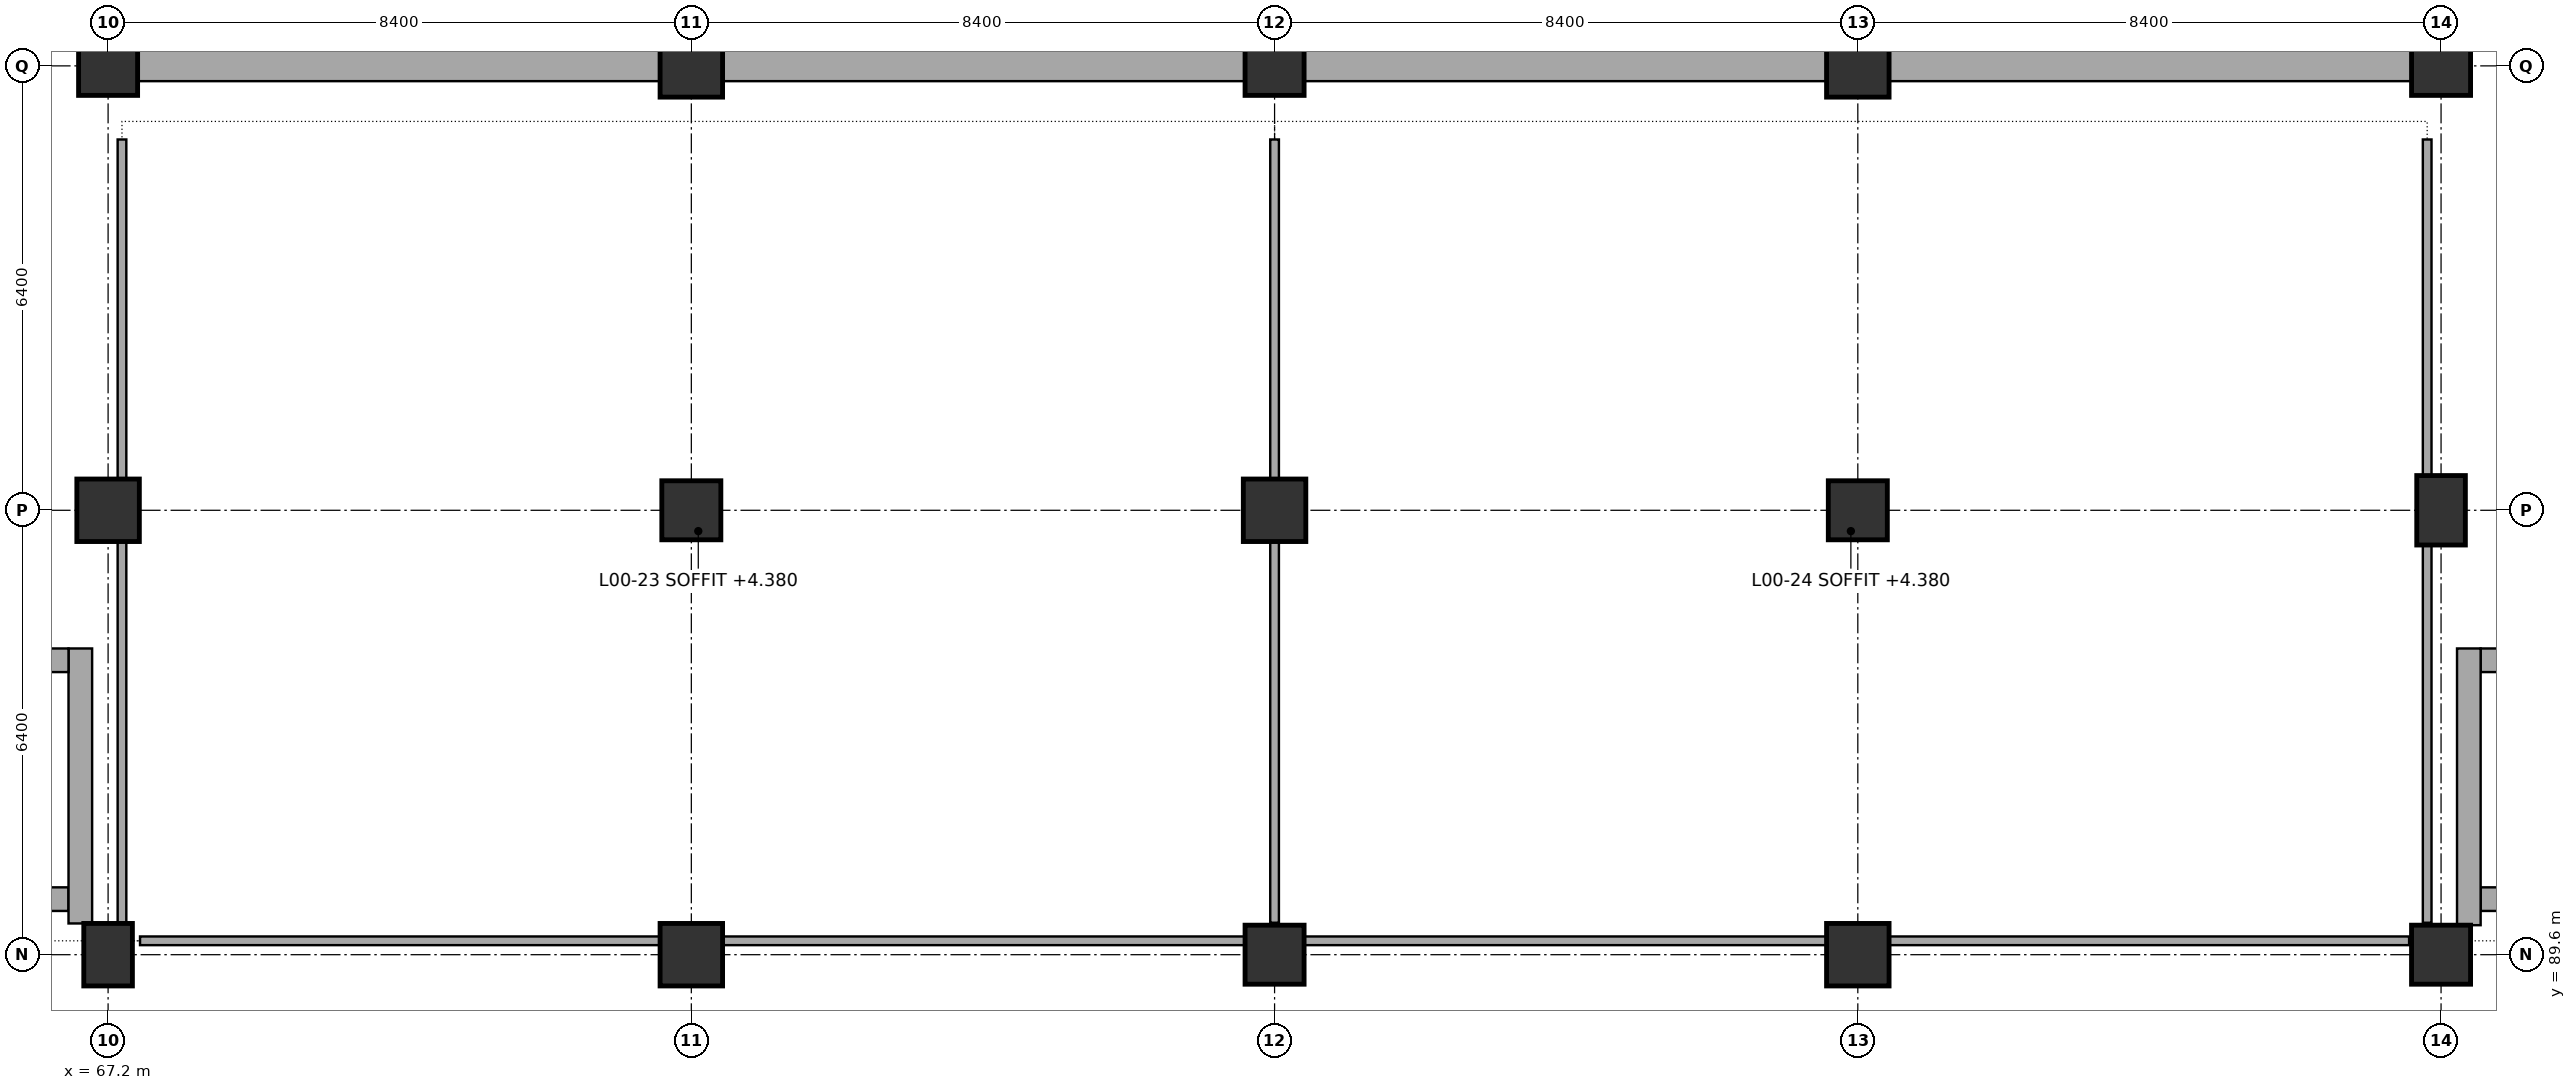
"""IFC4 building model, lengths in metres.
Left out: names, types, materials, properties, quantities, classifications, styles, units other than length and angle.
Written with IfcOpenShell. Run it as: python <this file> out.ifc"""

import sys

from ifc_helpers import new_model, si_unit, direction, frame, frame_2d, origin, origin_2d, place, context, subcontext, project, spatial, rectangle, extrude, element, fill, save


model = new_model("IFC4")
c1 = context("Model", 3, precision=1e-05, world=origin(), true_north=direction((0.0, 1.0)))
c2 = subcontext(c1, "Body", "Model", "MODEL_VIEW")
j1 = project(units=[si_unit("LENGTHUNIT", "METRE"), si_unit("PLANEANGLEUNIT", "RADIAN")], contexts=[c1])
p1 = place(None, origin())
s1 = spatial("IfcSite", under=j1, at=p1, CompositionType="ELEMENT")
p2 = place(p1, origin())
s2 = spatial("IfcBuilding", under=s1, at=p2, CompositionType="ELEMENT")
p3 = place(p2, origin())
s3 = spatial("IfcBuildingStorey", under=s2, at=p3, CompositionType="ELEMENT", Elevation=0.0)
p4 = place(p3, frame((67.2, 89.6, 0.0), z_axis=(0.0, 0.0, 1.0), x_axis=(1.0, 0.0, 0.0)))
e1 = element("IfcColumn", 1, at=p4, inside=s3, PredefinedType="COLUMN", context=c2, shape_type="SweptSolid", body=[
    extrude(rectangle(XDim=0.7, YDim=0.9, at=origin_2d()), origin(), (0.0, 0.0, 1.0), 4.8),
])
p5 = place(p3, frame((67.2, 96.0, 0.0), z_axis=(0.0, 0.0, 1.0), x_axis=(1.0, 0.0, 0.0)))
e2 = element("IfcColumn", 2, at=p5, inside=s3, PredefinedType="COLUMN", context=c2, shape_type="SweptSolid", body=[
    extrude(rectangle(XDim=0.9, YDim=0.9, at=origin_2d()), origin(), (0.0, 0.0, 1.0), 4.8),
])
p6 = place(p3, frame((67.2, 102.4, 0.0), z_axis=(0.0, 0.0, 1.0), x_axis=(1.0, 0.0, 0.0)))
e3 = element("IfcColumn", 3, at=p6, inside=s3, PredefinedType="COLUMN", context=c2, shape_type="SweptSolid", body=[
    extrude(rectangle(XDim=0.85, YDim=0.85, at=origin_2d()), origin(), (0.0, 0.0, 1.0), 4.8),
])
p7 = place(p3, frame((75.6, 89.6, 0.0), z_axis=(0.0, 0.0, 1.0), x_axis=(1.0, 0.0, 0.0)))
e4 = element("IfcColumn", 4, at=p7, inside=s3, PredefinedType="COLUMN", context=c2, shape_type="SweptSolid", body=[
    extrude(rectangle(XDim=0.9, YDim=0.9, at=origin_2d()), origin(), (0.0, 0.0, 1.0), 4.8),
])
p8 = place(p3, frame((75.6, 96.0, 0.0), z_axis=(0.0, 0.0, 1.0), x_axis=(1.0, 0.0, 0.0)))
e5 = element("IfcColumn", 5, at=p8, inside=s3, PredefinedType="COLUMN", context=c2, shape_type="SweptSolid", body=[
    extrude(rectangle(XDim=0.85, YDim=0.85, at=origin_2d()), origin(), (0.0, 0.0, 1.0), 4.8),
])
p9 = place(p3, frame((75.6, 102.4, 0.0), z_axis=(0.0, 0.0, 1.0), x_axis=(1.0, 0.0, 0.0)))
e6 = element("IfcColumn", 6, at=p9, inside=s3, PredefinedType="COLUMN", context=c2, shape_type="SweptSolid", body=[
    extrude(rectangle(XDim=0.9, YDim=0.9, at=origin_2d()), origin(), (0.0, 0.0, 1.0), 4.8),
])
p10 = place(p3, frame((84.0, 89.6, 0.0), z_axis=(0.0, 0.0, 1.0), x_axis=(1.0, 0.0, 0.0)))
e7 = element("IfcColumn", 7, at=p10, inside=s3, PredefinedType="COLUMN", context=c2, shape_type="SweptSolid", body=[
    extrude(rectangle(XDim=0.85, YDim=0.85, at=origin_2d()), origin(), (0.0, 0.0, 1.0), 4.8),
])
p11 = place(p3, frame((84.0, 96.0, 0.0), z_axis=(0.0, 0.0, 1.0), x_axis=(1.0, 0.0, 0.0)))
e8 = element("IfcColumn", 8, at=p11, inside=s3, PredefinedType="COLUMN", context=c2, shape_type="SweptSolid", body=[
    extrude(rectangle(XDim=0.9, YDim=0.9, at=origin_2d()), origin(), (0.0, 0.0, 1.0), 4.8),
])
p12 = place(p3, frame((84.0, 102.4, 0.0), z_axis=(0.0, 0.0, 1.0), x_axis=(1.0, 0.0, 0.0)))
e9 = element("IfcColumn", 9, at=p12, inside=s3, PredefinedType="COLUMN", context=c2, shape_type="SweptSolid", body=[
    extrude(rectangle(XDim=0.85, YDim=0.85, at=origin_2d()), origin(), (0.0, 0.0, 1.0), 4.8),
])
p13 = place(p3, frame((92.4, 89.6, 0.0), z_axis=(0.0, 0.0, 1.0), x_axis=(1.0, 0.0, 0.0)))
e10 = element("IfcColumn", 10, at=p13, inside=s3, PredefinedType="COLUMN", context=c2, shape_type="SweptSolid", body=[
    extrude(rectangle(XDim=0.9, YDim=0.9, at=origin_2d()), origin(), (0.0, 0.0, 1.0), 4.8),
])
p14 = place(p3, frame((92.4, 96.0, 0.0), z_axis=(0.0, 0.0, 1.0), x_axis=(1.0, 0.0, 0.0)))
e11 = element("IfcColumn", 11, at=p14, inside=s3, PredefinedType="COLUMN", context=c2, shape_type="SweptSolid", body=[
    extrude(rectangle(XDim=0.85, YDim=0.85, at=origin_2d()), origin(), (0.0, 0.0, 1.0), 4.8),
])
p15 = place(p3, frame((92.4, 102.4, 0.0), z_axis=(0.0, 0.0, 1.0), x_axis=(1.0, 0.0, 0.0)))
e12 = element("IfcColumn", 12, at=p15, inside=s3, PredefinedType="COLUMN", context=c2, shape_type="SweptSolid", body=[
    extrude(rectangle(XDim=0.9, YDim=0.9, at=origin_2d()), origin(), (0.0, 0.0, 1.0), 4.8),
])
p16 = place(p3, frame((100.8, 89.6, 0.0), z_axis=(0.0, 0.0, 1.0), x_axis=(1.0, 0.0, 0.0)))
e13 = element("IfcColumn", 13, at=p16, inside=s3, PredefinedType="COLUMN", context=c2, shape_type="SweptSolid", body=[
    extrude(rectangle(XDim=0.85, YDim=0.85, at=origin_2d()), origin(), (0.0, 0.0, 1.0), 4.8),
])
p17 = place(p3, frame((100.8, 96.0, 0.0), z_axis=(0.0, 0.0, 1.0), x_axis=(1.0, 0.0, 0.0)))
e14 = element("IfcColumn", 14, at=p17, inside=s3, PredefinedType="COLUMN", context=c2, shape_type="SweptSolid", body=[
    extrude(rectangle(XDim=0.7, YDim=1.0, at=origin_2d()), origin(), (0.0, 0.0, 1.0), 4.8),
])
p18 = place(p3, frame((100.8, 102.4, 0.0), z_axis=(0.0, 0.0, 1.0), x_axis=(1.0, 0.0, 0.0)))
e15 = element("IfcColumn", 15, at=p18, inside=s3, PredefinedType="COLUMN", context=c2, shape_type="SweptSolid", body=[
    extrude(rectangle(XDim=0.85, YDim=0.85, at=origin_2d()), origin(), (0.0, 0.0, 1.0), 4.8),
])
p19 = place(p3, frame((67.2, 108.8, 0.0), z_axis=(0.0, 0.0, 1.0), x_axis=(0.0, -1.0, 0.0)))
e16 = element("IfcWall", 16, at=p19, inside=s3, PredefinedType="STANDARD", context=c2, shape_type="SweptSolid", body=[
    extrude(rectangle(XDim=6.4, YDim=0.44, at=frame_2d((3.2, 0.0))), origin(), (0.0, 0.0, 1.0), 4.44),
])
p20 = place(p19, frame((2.1, 0.0, 0.0)))
e17 = element("IfcOpeningElement", 17, at=p20, cuts=e16, PredefinedType="OPENING", context=c2, shape_type="SweptSolid", body=[
    extrude(rectangle(XDim=2.2, YDim=2.45, at=frame_2d((1.1, 1.225))), frame((0.0, 0.23, 0.0), z_axis=(0.0, -1.0, 0.0), x_axis=(1.0, 0.0, 0.0)), (0.0, 0.0, 1.0), 0.46),
])
p21 = place(p3, frame((67.2, 102.4, 0.0), z_axis=(0.0, 0.0, 1.0), x_axis=(1.0, 0.0, 0.0)))
e18 = element("IfcWall", 18, at=p21, inside=s3, PredefinedType="STANDARD", context=c2, shape_type="SweptSolid", body=[
    extrude(rectangle(XDim=8.4, YDim=0.44, at=frame_2d((4.2, 0.0))), origin(), (0.0, 0.0, 1.0), 4.44),
])
p22 = place(p21, frame((3.1, 0.0, 0.0)))
e19 = element("IfcOpeningElement", 19, at=p22, cuts=e18, PredefinedType="OPENING", context=c2, shape_type="SweptSolid", body=[
    extrude(rectangle(XDim=2.2, YDim=2.45, at=frame_2d((1.1, 1.225))), frame((0.0, 0.23, 0.0), z_axis=(0.0, -1.0, 0.0), x_axis=(1.0, 0.0, 0.0)), (0.0, 0.0, 1.0), 0.46),
])
p23 = place(p3, frame((75.6, 102.4, 0.0), z_axis=(0.0, 0.0, 1.0), x_axis=(1.0, 0.0, 0.0)))
e20 = element("IfcWall", 20, at=p23, inside=s3, PredefinedType="STANDARD", context=c2, shape_type="SweptSolid", body=[
    extrude(rectangle(XDim=8.4, YDim=0.44, at=frame_2d((4.2, 0.0))), origin(), (0.0, 0.0, 1.0), 4.44),
])
p24 = place(p23, frame((3.1, 0.0, 0.0)))
e21 = element("IfcOpeningElement", 21, at=p24, cuts=e20, PredefinedType="OPENING", context=c2, shape_type="SweptSolid", body=[
    extrude(rectangle(XDim=2.2, YDim=2.45, at=frame_2d((1.1, 1.225))), frame((0.0, 0.23, 0.0), z_axis=(0.0, -1.0, 0.0), x_axis=(1.0, 0.0, 0.0)), (0.0, 0.0, 1.0), 0.46),
])
p25 = place(p3, frame((84.0, 102.4, 0.0), z_axis=(0.0, 0.0, 1.0), x_axis=(1.0, 0.0, 0.0)))
e22 = element("IfcWall", 22, at=p25, inside=s3, PredefinedType="STANDARD", context=c2, shape_type="SweptSolid", body=[
    extrude(rectangle(XDim=8.4, YDim=0.44, at=frame_2d((4.2, 0.0))), origin(), (0.0, 0.0, 1.0), 4.44),
])
p26 = place(p25, frame((3.1, 0.0, 0.0)))
e23 = element("IfcOpeningElement", 23, at=p26, cuts=e22, PredefinedType="OPENING", context=c2, shape_type="SweptSolid", body=[
    extrude(rectangle(XDim=2.2, YDim=2.45, at=frame_2d((1.1, 1.225))), frame((0.0, 0.23, 0.0), z_axis=(0.0, -1.0, 0.0), x_axis=(1.0, 0.0, 0.0)), (0.0, 0.0, 1.0), 0.46),
])
p27 = place(p3, frame((92.4, 102.4, 0.0), z_axis=(0.0, 0.0, 1.0), x_axis=(1.0, 0.0, 0.0)))
e24 = element("IfcWall", 24, at=p27, inside=s3, PredefinedType="STANDARD", context=c2, shape_type="SweptSolid", body=[
    extrude(rectangle(XDim=8.4, YDim=0.44, at=frame_2d((4.2, 0.0))), origin(), (0.0, 0.0, 1.0), 4.44),
])
p28 = place(p27, frame((3.18, 0.0, 0.0)))
e25 = element("IfcOpeningElement", 25, at=p28, cuts=e24, PredefinedType="OPENING", context=c2, shape_type="SweptSolid", body=[
    extrude(rectangle(XDim=2.04, YDim=2.4, at=frame_2d((1.02, 1.2))), frame((0.0, 0.23, 0.0), z_axis=(0.0, -1.0, 0.0), x_axis=(1.0, 0.0, 0.0)), (0.0, 0.0, 1.0), 0.46),
])
p29 = place(p3, frame((100.8, 102.4, 0.0), z_axis=(0.0, 0.0, 1.0), x_axis=(0.0, 1.0, 0.0)))
e26 = element("IfcWall", 26, at=p29, inside=s3, PredefinedType="STANDARD", context=c2, shape_type="SweptSolid", body=[
    extrude(rectangle(XDim=6.4, YDim=0.44, at=frame_2d((3.2, 0.0))), origin(), (0.0, 0.0, 1.0), 4.44),
])
p30 = place(p29, frame((2.18, 0.0, 0.0)))
e27 = element("IfcOpeningElement", 27, at=p30, cuts=e26, PredefinedType="OPENING", context=c2, shape_type="SweptSolid", body=[
    extrude(rectangle(XDim=2.04, YDim=2.4, at=frame_2d((1.02, 1.2))), frame((0.0, 0.23, 0.0), z_axis=(0.0, -1.0, 0.0), x_axis=(1.0, 0.0, 0.0)), (0.0, 0.0, 1.0), 0.46),
])
p31 = place(p3, frame((59.37, 90.4, 0.0), z_axis=(0.0, 0.0, 1.0), x_axis=(1.0, 0.0, 0.0)))
e28 = element("IfcWall", 28, at=p31, inside=s3, PredefinedType="SHEAR", context=c2, shape_type="SweptSolid", body=[
    extrude(rectangle(XDim=7.26, YDim=0.34, at=frame_2d((3.63, 0.0))), origin(), (0.0, 0.0, 1.0), 4.8),
])
p32 = place(p3, frame((66.8, 90.05, 0.0), z_axis=(0.0, 0.0, 1.0), x_axis=(0.0, 1.0, 0.0)))
e29 = element("IfcWall", 29, at=p32, inside=s3, PredefinedType="SHEAR", context=c2, shape_type="SweptSolid", body=[
    extrude(rectangle(XDim=3.96, YDim=0.34, at=frame_2d((1.98, 0.0))), origin(), (0.0, 0.0, 1.0), 4.8),
])
for number, where, z_axis, x_axis in (
    (30, (66.63, 93.84, 0.0), (0.0, 0.0, 1.0), (-1.0, 0.0, 0.0)),
    (31, (101.37, 90.4, 0.0), (0.0, 0.0, 1.0), (1.0, 0.0, 0.0)),
    (32, (108.63, 93.84, 0.0), (0.0, 0.0, 1.0), (-1.0, 0.0, 0.0)),
):
    element("IfcWall", number, at=place(p3, frame(where, z_axis=z_axis, x_axis=x_axis)), inside=s3, PredefinedType="SHEAR", context=c2, shape_type="SweptSolid", body=[
        extrude(rectangle(XDim=7.26, YDim=0.34, at=frame_2d((3.63, 0.0))), origin(), (0.0, 0.0, 1.0), 4.8),
    ])
p33 = place(p3, frame((101.2, 94.01, 0.0), z_axis=(0.0, 0.0, 1.0), x_axis=(0.0, -1.0, 0.0)))
e33 = element("IfcWall", 33, at=p33, inside=s3, PredefinedType="SHEAR", context=c2, shape_type="SweptSolid", body=[
    extrude(rectangle(XDim=3.985, YDim=0.34, at=frame_2d((1.993, 0.0))), origin(), (0.0, 0.0, 1.0), 4.8),
])
p34 = place(p33, frame((1.343, 0.0, 0.0)))
e34 = element("IfcOpeningElement", 34, at=p34, cuts=e33, PredefinedType="OPENING", context=c2, shape_type="SweptSolid", body=[
    extrude(rectangle(XDim=1.3, YDim=2.15, at=frame_2d((0.65, 1.075))), frame((0.0, 0.18, 0.0), z_axis=(0.0, -1.0, 0.0), x_axis=(1.0, 0.0, 0.0)), (0.0, 0.0, 1.0), 0.36),
])
p35 = place(p3, frame((67.66, 89.8, 0.0), z_axis=(0.0, 0.0, 1.0), x_axis=(1.0, 0.0, 0.0)))
e35 = element("IfcWall", 35, at=p35, inside=s3, PredefinedType="PARTITIONING", context=c2, shape_type="SweptSolid", body=[
    extrude(rectangle(XDim=16.08, YDim=0.125, at=frame_2d((8.04, 0.0))), origin(), (0.0, 0.0, 1.0), 3.665),
])
p36 = place(p35, frame((9.15, 0.0, 0.0)))
e36 = element("IfcOpeningElement", 36, at=p36, cuts=e35, PredefinedType="OPENING", context=c2, shape_type="SweptSolid", body=[
    extrude(rectangle(XDim=0.98, YDim=2.1, at=frame_2d((0.49, 1.05))), frame((0.0, 0.073, 0.0), z_axis=(0.0, -1.0, 0.0), x_axis=(1.0, 0.0, 0.0)), (0.0, 0.0, 1.0), 0.145),
])
p37 = place(p3, frame((84.0, 90.06, 0.0), z_axis=(0.0, 0.0, 1.0), x_axis=(0.0, 1.0, 0.0)))
e37 = element("IfcWall", 37, at=p37, inside=s3, PredefinedType="PARTITIONING", context=c2, shape_type="SweptSolid", body=[
    extrude(rectangle(XDim=11.28, YDim=0.125, at=frame_2d((5.64, 0.0))), origin(), (0.0, 0.0, 1.0), 3.565),
])
p38 = place(p3, frame((67.4, 101.34, 0.0), z_axis=(0.0, 0.0, 1.0), x_axis=(0.0, -1.0, 0.0)))
e38 = element("IfcWall", 38, at=p38, inside=s3, PredefinedType="PARTITIONING", context=c2, shape_type="SweptSolid", body=[
    extrude(rectangle(XDim=11.28, YDim=0.125, at=frame_2d((5.64, 0.0))), origin(), (0.0, 0.0, 1.0), 3.615),
])
p39 = place(p3, frame((84.26, 89.8, 0.0), z_axis=(0.0, 0.0, 1.0), x_axis=(1.0, 0.0, 0.0)))
e39 = element("IfcWall", 39, at=p39, inside=s3, PredefinedType="PARTITIONING", context=c2, shape_type="SweptSolid", body=[
    extrude(rectangle(XDim=16.08, YDim=0.125, at=frame_2d((8.04, 0.0))), origin(), (0.0, 0.0, 1.0), 3.615),
])
p40 = place(p39, frame((9.15, 0.0, 0.0)))
e40 = element("IfcOpeningElement", 40, at=p40, cuts=e39, PredefinedType="OPENING", context=c2, shape_type="SweptSolid", body=[
    extrude(rectangle(XDim=0.98, YDim=2.1, at=frame_2d((0.49, 1.05))), frame((0.0, 0.073, 0.0), z_axis=(0.0, -1.0, 0.0), x_axis=(1.0, 0.0, 0.0)), (0.0, 0.0, 1.0), 0.145),
])
p41 = place(p3, frame((100.6, 90.06, 0.0), z_axis=(0.0, 0.0, 1.0), x_axis=(0.0, 1.0, 0.0)))
e41 = element("IfcWall", 41, at=p41, inside=s3, PredefinedType="PARTITIONING", context=c2, shape_type="SweptSolid", body=[
    extrude(rectangle(XDim=11.28, YDim=0.125, at=frame_2d((5.64, 0.0))), origin(), (0.0, 0.0, 1.0), 3.465),
])
p42 = place(p22, frame((2.2, 0.0, 0.0), z_axis=(0.0, 0.0, 1.0), x_axis=(-1.0, 0.0, 0.0)))
e42 = element("IfcDoor", 42, at=p42, inside=s3, OperationType="DOUBLE_DOOR_SINGLE_SWING", PredefinedType="DOOR", context=c2, shape_type="SweptSolid", body=[
    extrude(rectangle(XDim=2.2, YDim=2.45, at=frame_2d((1.1, 1.225))), frame((0.0, 0.025, 0.0), z_axis=(0.0, -1.0, 0.0), x_axis=(1.0, 0.0, 0.0)), (0.0, 0.0, 1.0), 0.05),
])
fill(e19, e42)
p43 = place(p24, frame((2.2, 0.0, 0.0), z_axis=(0.0, 0.0, 1.0), x_axis=(-1.0, 0.0, 0.0)))
e43 = element("IfcDoor", 43, at=p43, inside=s3, OperationType="DOUBLE_DOOR_SINGLE_SWING", PredefinedType="DOOR", context=c2, shape_type="SweptSolid", body=[
    extrude(rectangle(XDim=2.2, YDim=2.45, at=frame_2d((1.1, 1.225))), frame((0.0, 0.025, 0.0), z_axis=(0.0, -1.0, 0.0), x_axis=(1.0, 0.0, 0.0)), (0.0, 0.0, 1.0), 0.05),
])
fill(e21, e43)
p44 = place(p26, frame((2.2, 0.0, 0.0), z_axis=(0.0, 0.0, 1.0), x_axis=(-1.0, 0.0, 0.0)))
e44 = element("IfcDoor", 44, at=p44, inside=s3, OperationType="DOUBLE_DOOR_SINGLE_SWING", PredefinedType="DOOR", context=c2, shape_type="SweptSolid", body=[
    extrude(rectangle(XDim=2.2, YDim=2.45, at=frame_2d((1.1, 1.225))), frame((0.0, 0.025, 0.0), z_axis=(0.0, -1.0, 0.0), x_axis=(1.0, 0.0, 0.0)), (0.0, 0.0, 1.0), 0.05),
])
fill(e23, e44)
p45 = place(p28, frame((2.04, 0.0, 0.0), z_axis=(0.0, 0.0, 1.0), x_axis=(-1.0, 0.0, 0.0)))
e45 = element("IfcDoor", 45, at=p45, inside=s3, OperationType="DOUBLE_DOOR_SINGLE_SWING", PredefinedType="DOOR", context=c2, shape_type="SweptSolid", body=[
    extrude(rectangle(XDim=2.04, YDim=2.4, at=frame_2d((1.02, 1.2))), frame((0.0, 0.025, 0.0), z_axis=(0.0, -1.0, 0.0), x_axis=(1.0, 0.0, 0.0)), (0.0, 0.0, 1.0), 0.05),
])
fill(e25, e45)
p46 = place(p34, frame((1.3, 0.0, 0.0), z_axis=(0.0, 0.0, 1.0), x_axis=(-1.0, 0.0, 0.0)))
e46 = element("IfcDoor", 46, at=p46, inside=s3, OperationType="SINGLE_SWING_RIGHT", PredefinedType="DOOR", context=c2, shape_type="SweptSolid", body=[
    extrude(rectangle(XDim=1.3, YDim=2.15, at=frame_2d((0.65, 1.075))), frame((0.0, 0.025, 0.0), z_axis=(0.0, -1.0, 0.0), x_axis=(1.0, 0.0, 0.0)), (0.0, 0.0, 1.0), 0.05),
])
fill(e34, e46)
p47 = place(p36, origin())
e47 = element("IfcDoor", 47, at=p47, inside=s3, OperationType="SINGLE_SWING_RIGHT", PredefinedType="DOOR", context=c2, shape_type="SweptSolid", body=[
    extrude(rectangle(XDim=0.98, YDim=2.1, at=frame_2d((0.49, 1.05))), frame((0.0, 0.025, 0.0), z_axis=(0.0, -1.0, 0.0), x_axis=(1.0, 0.0, 0.0)), (0.0, 0.0, 1.0), 0.05),
])
fill(e36, e47)
p48 = place(p40, origin())
e48 = element("IfcDoor", 48, at=p48, inside=s3, OperationType="SINGLE_SWING_LEFT", PredefinedType="DOOR", context=c2, shape_type="SweptSolid", body=[
    extrude(rectangle(XDim=0.98, YDim=2.1, at=frame_2d((0.49, 1.05))), frame((0.0, 0.025, 0.0), z_axis=(0.0, -1.0, 0.0), x_axis=(1.0, 0.0, 0.0)), (0.0, 0.0, 1.0), 0.05),
])
fill(e40, e48)
save(model, sys.argv[1])
